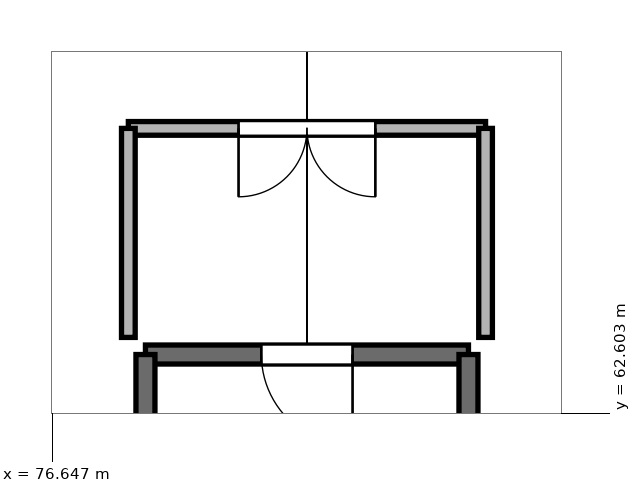
"""IFC4 building model, lengths in metres.
Left out: names, types, materials, properties, quantities, classifications, styles, units other than length and angle.
Written with IfcOpenShell. Run it as: python <this file> out.ifc"""

import sys

from ifc_helpers import new_model, si_unit, direction, frame, frame_2d, origin, place, context, subcontext, project, spatial, rectangle, extrude, element, fill, save


model = new_model("IFC4")
c1 = context("Model", 3, precision=1e-05, world=origin(), true_north=direction((0.0, 1.0)))
c2 = subcontext(c1, "Body", "Model", "MODEL_VIEW")
j1 = project(units=[si_unit("LENGTHUNIT", "METRE"), si_unit("PLANEANGLEUNIT", "RADIAN")], contexts=[c1])
p1 = place(None, origin())
s1 = spatial("IfcSite", under=j1, at=p1, CompositionType="ELEMENT")
p2 = place(p1, origin())
s2 = spatial("IfcBuilding", under=s1, at=p2, CompositionType="ELEMENT")
p3 = place(p2, frame((0.0, 0.0, 53.55)))
s3 = spatial("IfcBuildingStorey", under=s2, at=p3, CompositionType="ELEMENT", Elevation=53.55)
p4 = place(p3, frame((82.125, 63.375, 0.0), z_axis=(0.0, 0.0, 1.0), x_axis=(-1.0, 0.0, 0.0)))
e1 = element("IfcWall", 1, at=p4, inside=s3, PredefinedType="SHEAR", context=c2, shape_type="SweptSolid", body=[
    extrude(rectangle(XDim=4.25, YDim=0.25, at=frame_2d((2.125, 0.0))), origin(), (0.0, 0.0, 1.0), 3.03),
])
p5 = place(p4, frame((1.525, 0.0, 0.0)))
e2 = element("IfcOpeningElement", 2, at=p5, cuts=e1, PredefinedType="OPENING", context=c2, shape_type="SweptSolid", body=[
    extrude(rectangle(XDim=1.2, YDim=2.2, at=frame_2d((0.6, 1.1))), frame((0.0, 0.137, 0.0), z_axis=(0.0, -1.0, 0.0), x_axis=(1.0, 0.0, 0.0)), (0.0, 0.0, 1.0), 0.274),
])
for number, where, z_axis, x_axis in (
    (3, (77.875, 63.375, 0.0), (0.0, 0.0, 1.0), (0.0, -1.0, 0.0)),
    (4, (82.125, 56.175, 0.0), (0.0, 0.0, 1.0), (0.0, 1.0, 0.0)),
):
    element("IfcWall", number, at=place(p3, frame(where, z_axis=z_axis, x_axis=x_axis)), inside=s3, PredefinedType="SHEAR", context=c2, shape_type="SweptSolid", body=[
        extrude(rectangle(XDim=7.2, YDim=0.25, at=frame_2d((3.6, 0.0))), origin(), (0.0, 0.0, 1.0), 3.03),
    ])
p6 = place(p3, frame((77.65, 66.35, 0.0), z_axis=(0.0, 0.0, 1.0), x_axis=(1.0, 0.0, 0.0)))
e5 = element("IfcWall", 5, at=p6, inside=s3, PredefinedType="PARTITIONING", context=c2, shape_type="SweptSolid", body=[
    extrude(rectangle(XDim=4.7, YDim=0.18, at=frame_2d((2.35, 0.0))), origin(), (0.0, 0.0, 1.0), 2.53),
])
p7 = place(p6, frame((1.45, 0.0, 0.0)))
e6 = element("IfcOpeningElement", 6, at=p7, cuts=e5, PredefinedType="OPENING", context=c2, shape_type="SweptSolid", body=[
    extrude(rectangle(XDim=1.8, YDim=2.2, at=frame_2d((0.9, 1.1))), frame((0.0, 0.102, 0.0), z_axis=(0.0, -1.0, 0.0), x_axis=(1.0, 0.0, 0.0)), (0.0, 0.0, 1.0), 0.204),
])
for number, where, z_axis, x_axis in (
    (7, (77.65, 63.6, 0.0), (0.0, 0.0, 1.0), (0.0, 1.0, 0.0)),
    (8, (82.35, 63.6, 0.0), (0.0, 0.0, 1.0), (0.0, 1.0, 0.0)),
):
    element("IfcWall", number, at=place(p3, frame(where, z_axis=z_axis, x_axis=x_axis)), inside=s3, PredefinedType="PARTITIONING", context=c2, shape_type="SweptSolid", body=[
        extrude(rectangle(XDim=2.75, YDim=0.18, at=frame_2d((1.375, 0.0))), origin(), (0.0, 0.0, 1.0), 2.53),
    ])
p8 = place(p5, origin())
e9 = element("IfcDoor", 9, at=p8, inside=s3, OperationType="SINGLE_SWING_LEFT", PredefinedType="DOOR", context=c2, shape_type="SweptSolid", body=[
    extrude(rectangle(XDim=1.2, YDim=2.2, at=frame_2d((0.6, 1.1))), frame((0.0, 0.025, 0.0), z_axis=(0.0, -1.0, 0.0), x_axis=(1.0, 0.0, 0.0)), (0.0, 0.0, 1.0), 0.05),
])
fill(e2, e9)
p9 = place(p7, frame((1.8, 0.0, 0.0), z_axis=(0.0, 0.0, 1.0), x_axis=(-1.0, 0.0, 0.0)))
e10 = element("IfcDoor", 10, at=p9, inside=s3, OperationType="DOUBLE_DOOR_SINGLE_SWING", PredefinedType="DOOR", context=c2, shape_type="SweptSolid", body=[
    extrude(rectangle(XDim=1.8, YDim=2.2, at=frame_2d((0.9, 1.1))), frame((0.0, 0.025, 0.0), z_axis=(0.0, -1.0, 0.0), x_axis=(1.0, 0.0, 0.0)), (0.0, 0.0, 1.0), 0.05),
])
fill(e6, e10)
save(model, sys.argv[1])
